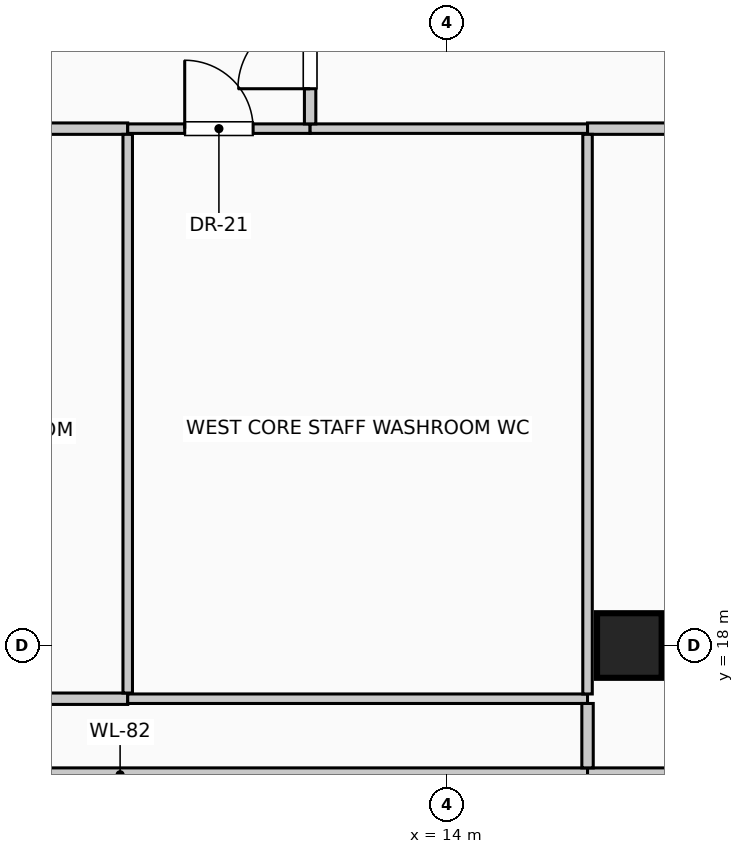
"""IFC4 building model, lengths in metres.
Left out: names, types, materials, properties, quantities, classifications, styles, units other than length and angle.
Written with IfcOpenShell. Run it as: python <this file> out.ifc"""

import sys

from ifc_helpers import new_model, si_unit, direction, frame, frame_2d, origin, origin_2d, place, context, subcontext, project, spatial, rectangle, circle, extrude, element, fill, save


model = new_model("IFC4")
c1 = context("Model", 3, precision=1e-05, world=origin(), true_north=direction((0.0, 1.0)))
c2 = subcontext(c1, "Body", "Model", "MODEL_VIEW")
j1 = project(units=[si_unit("LENGTHUNIT", "METRE"), si_unit("PLANEANGLEUNIT", "RADIAN")], contexts=[c1])
p1 = place(None, origin())
s1 = spatial("IfcSite", under=j1, at=p1, CompositionType="ELEMENT")
p2 = place(p1, origin())
s2 = spatial("IfcBuilding", under=s1, at=p2, CompositionType="ELEMENT")
p3 = place(p2, frame((0.0, 0.0, 214.6)))
s3 = spatial("IfcBuildingStorey", under=s2, at=p3, CompositionType="ELEMENT", Elevation=214.6)
p4 = place(p3, frame((16.4, 18.0, 0.0), z_axis=(0.0, 0.0, 1.0), x_axis=(1.0, 0.0, 0.0)))
e1 = element("IfcColumn", 1, at=p4, inside=s3, PredefinedType="COLUMN", context=c2, shape_type="SweptSolid", body=[
    extrude(circle(Radius=0.425, at=origin_2d()), origin(), (0.0, 0.0, 1.0), 4.0),
])
p5 = place(p3, frame((3.55, 16.3, 0.0), z_axis=(0.0, 0.0, 1.0), x_axis=(1.0, 0.0, 0.0)))
e2 = element("IfcWall", 2, at=p5, inside=s3, PredefinedType="PARTITIONING", context=c2, shape_type="SweptSolid", body=[
    extrude(rectangle(XDim=12.3, YDim=0.18, at=frame_2d((6.15, 0.0))), origin(), (0.0, 0.0, 1.0), 3.75),
])
p6 = place(p3, frame((15.85, 16.3, 0.0), z_axis=(0.0, 0.0, 1.0), x_axis=(1.0, 0.0, 0.0)))
e3 = element("IfcWall", 3, at=p6, inside=s3, PredefinedType="PARTITIONING", context=c2, shape_type="SweptSolid", body=[
    extrude(rectangle(XDim=5.15, YDim=0.18, at=frame_2d((2.575, 0.0))), origin(), (0.0, 0.0, 1.0), 3.75),
])
p7 = place(p6, frame((2.1, 0.0, 0.0)))
e4 = element("IfcOpeningElement", 4, at=p7, cuts=e3, PredefinedType="OPENING", context=c2, shape_type="SweptSolid", body=[
    extrude(rectangle(XDim=0.95, YDim=2.15, at=frame_2d((0.475, 1.075))), frame((0.0, 0.1, 0.0), z_axis=(0.0, -1.0, 0.0), x_axis=(1.0, 0.0, 0.0)), (0.0, 0.0, 1.0), 0.2),
])
p8 = place(p3, frame((3.55, 17.3, 0.0), z_axis=(0.0, 0.0, 1.0), x_axis=(1.0, 0.0, 0.0)))
e5 = element("IfcWall", 5, at=p8, inside=s3, PredefinedType="PARTITIONING", context=c2, shape_type="SweptSolid", body=[
    extrude(rectangle(XDim=6.25, YDim=0.15, at=frame_2d((3.125, 0.0))), origin(), (0.0, 0.0, 1.0), 3.75),
])
p9 = place(p3, frame((9.8, 17.3, 0.0), z_axis=(0.0, 0.0, 1.0), x_axis=(1.0, 0.0, 0.0)))
e6 = element("IfcWall", 6, at=p9, inside=s3, PredefinedType="PARTITIONING", context=c2, shape_type="SweptSolid", body=[
    extrude(rectangle(XDim=6.05, YDim=0.125, at=frame_2d((3.025, 0.0))), origin(), (0.0, 0.0, 1.0), 3.75),
])
p10 = place(p3, frame((3.55, 24.8, 0.0), z_axis=(0.0, 0.0, 1.0), x_axis=(1.0, 0.0, 0.0)))
e7 = element("IfcWall", 7, at=p10, inside=s3, PredefinedType="PARTITIONING", context=c2, shape_type="SweptSolid", body=[
    extrude(rectangle(XDim=6.25, YDim=0.15, at=frame_2d((3.125, 0.0))), origin(), (0.0, 0.0, 1.0), 3.75),
])
p11 = place(p10, frame((2.65, 0.0, 0.0)))
e8 = element("IfcOpeningElement", 8, at=p11, cuts=e7, PredefinedType="OPENING", context=c2, shape_type="SweptSolid", body=[
    extrude(rectangle(XDim=0.95, YDim=2.15, at=frame_2d((0.475, 1.075))), frame((0.0, 0.085, 0.0), z_axis=(0.0, -1.0, 0.0), x_axis=(1.0, 0.0, 0.0)), (0.0, 0.0, 1.0), 0.17),
])
p12 = place(p3, frame((9.8, 24.8, 0.0), z_axis=(0.0, 0.0, 1.0), x_axis=(1.0, 0.0, 0.0)))
e9 = element("IfcWall", 9, at=p12, inside=s3, PredefinedType="PARTITIONING", context=c2, shape_type="SweptSolid", body=[
    extrude(rectangle(XDim=2.4, YDim=0.125, at=frame_2d((1.2, 0.0))), origin(), (0.0, 0.0, 1.0), 3.75),
])
p13 = place(p12, frame((0.75, 0.0, 0.0)))
e10 = element("IfcOpeningElement", 10, at=p13, cuts=e9, PredefinedType="OPENING", context=c2, shape_type="SweptSolid", body=[
    extrude(rectangle(XDim=0.9, YDim=2.1, at=frame_2d((0.45, 1.05))), frame((0.0, 0.073, 0.0), z_axis=(0.0, -1.0, 0.0), x_axis=(1.0, 0.0, 0.0)), (0.0, 0.0, 1.0), 0.145),
])
p14 = place(p3, frame((12.2, 24.8, 0.0), z_axis=(0.0, 0.0, 1.0), x_axis=(1.0, 0.0, 0.0)))
e11 = element("IfcWall", 11, at=p14, inside=s3, PredefinedType="PARTITIONING", context=c2, shape_type="SweptSolid", body=[
    extrude(rectangle(XDim=3.65, YDim=0.125, at=frame_2d((1.825, 0.0))), origin(), (0.0, 0.0, 1.0), 3.75),
])
p15 = place(p3, frame((15.85, 24.8, 0.0), z_axis=(0.0, 0.0, 1.0), x_axis=(1.0, 0.0, 0.0)))
e12 = element("IfcWall", 12, at=p15, inside=s3, PredefinedType="PARTITIONING", context=c2, shape_type="SweptSolid", body=[
    extrude(rectangle(XDim=5.15, YDim=0.15, at=frame_2d((2.575, 0.0))), origin(), (0.0, 0.0, 1.0), 3.75),
])
p16 = place(p3, frame((9.8, 17.375, 0.0), z_axis=(0.0, 0.0, 1.0), x_axis=(0.0, 1.0, 0.0)))
e13 = element("IfcWall", 13, at=p16, inside=s3, PredefinedType="PARTITIONING", context=c2, shape_type="SweptSolid", body=[
    extrude(rectangle(XDim=7.35, YDim=0.125, at=frame_2d((3.675, 0.0))), origin(), (0.0, 0.0, 1.0), 3.75),
])
p17 = place(p3, frame((12.2, 24.863, 0.0), z_axis=(0.0, 0.0, 1.0), x_axis=(0.0, 1.0, 0.0)))
e14 = element("IfcWall", 14, at=p17, inside=s3, PredefinedType="PARTITIONING", context=c2, shape_type="SweptSolid", body=[
    extrude(rectangle(XDim=1.875, YDim=0.15, at=frame_2d((0.938, 0.0))), origin(), (0.0, 0.0, 1.0), 3.75),
])
p18 = place(p17, frame((0.462, 0.0, 0.0)))
e15 = element("IfcOpeningElement", 15, at=p18, cuts=e14, PredefinedType="OPENING", context=c2, shape_type="SweptSolid", body=[
    extrude(rectangle(XDim=0.95, YDim=2.15, at=frame_2d((0.475, 1.075))), frame((0.0, 0.085, 0.0), z_axis=(0.0, -1.0, 0.0), x_axis=(1.0, 0.0, 0.0)), (0.0, 0.0, 1.0), 0.17),
])
p19 = place(p3, frame((15.85, 16.39, 0.0), z_axis=(0.0, 0.0, 1.0), x_axis=(0.0, 1.0, 0.0)))
e16 = element("IfcWall", 16, at=p19, inside=s3, PredefinedType="PARTITIONING", context=c2, shape_type="SweptSolid", body=[
    extrude(rectangle(XDim=0.848, YDim=0.15, at=frame_2d((0.424, 0.0))), origin(), (0.0, 0.0, 1.0), 3.75),
])
p20 = place(p3, frame((15.85, 17.363, 0.0), z_axis=(0.0, 0.0, 1.0), x_axis=(0.0, 1.0, 0.0)))
e17 = element("IfcWall", 17, at=p20, inside=s3, PredefinedType="PARTITIONING", context=c2, shape_type="SweptSolid", body=[
    extrude(rectangle(XDim=7.363, YDim=0.125, at=frame_2d((3.681, 0.0))), origin(), (0.0, 0.0, 1.0), 3.75),
])
p21 = place(p13, origin())
e18 = element("IfcDoor", 18, at=p21, inside=s3, OperationType="SINGLE_SWING_LEFT", PredefinedType="DOOR", context=c2, shape_type="SweptSolid", body=[
    extrude(rectangle(XDim=0.9, YDim=2.1, at=frame_2d((0.45, 1.05))), frame((0.0, 0.025, 0.0), z_axis=(0.0, -1.0, 0.0), x_axis=(1.0, 0.0, 0.0)), (0.0, 0.0, 1.0), 0.05),
])
fill(e10, e18)
p22 = place(p18, origin())
e19 = element("IfcDoor", 19, at=p22, inside=s3, OperationType="SINGLE_SWING_LEFT", PredefinedType="DOOR", context=c2, shape_type="SweptSolid", body=[
    extrude(rectangle(XDim=0.95, YDim=2.15, at=frame_2d((0.475, 1.075))), frame((0.0, 0.025, 0.0), z_axis=(0.0, -1.0, 0.0), x_axis=(1.0, 0.0, 0.0)), (0.0, 0.0, 1.0), 0.05),
])
fill(e15, e19)
save(model, sys.argv[1])
